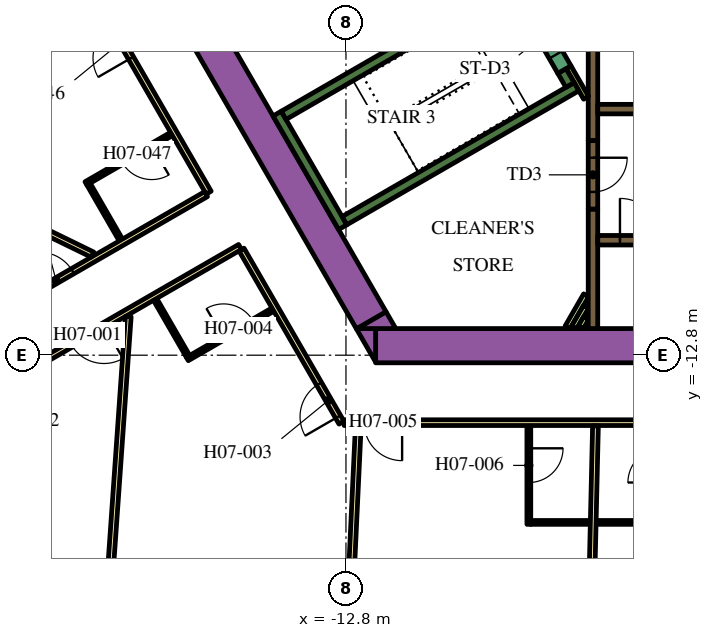
"""IFC4 building model, lengths in metres.
Left out: names, types, materials, properties, quantities, classifications, styles, units other than length and angle.
Written with IfcOpenShell. Run it as: python <this file> out.ifc"""

import sys

from ifc_helpers import new_model, si_unit, direction, frame, frame_2d, origin, place, context, subcontext, project, spatial, polyline, rectangle, outline, extrude, element, fill, save


model = new_model("IFC4")
c1 = context("Model", 3, precision=1e-05, world=origin(), true_north=direction((0.0, 1.0)))
c2 = subcontext(c1, "Body", "Model", "MODEL_VIEW")
j1 = project(units=[si_unit("LENGTHUNIT", "METRE"), si_unit("PLANEANGLEUNIT", "RADIAN")], contexts=[c1])
p1 = place(None, origin())
s1 = spatial("IfcSite", under=j1, at=p1, CompositionType="ELEMENT")
p2 = place(p1, origin())
s2 = spatial("IfcBuilding", under=s1, at=p2, CompositionType="ELEMENT")
p3 = place(p2, frame((0.0, 0.0, 103.2)))
s3 = spatial("IfcBuildingStorey", under=s2, at=p3, CompositionType="ELEMENT", Elevation=103.2)
p4 = place(p3, frame((-12.019, -12.55, 0.0), z_axis=(0.0, 0.0, 1.0), x_axis=(1.0, 0.0, 0.0)))
e1 = element("IfcWall", 1, at=p4, inside=s3, PredefinedType="SOLIDWALL", context=c2, shape_type="SweptSolid", body=[
    extrude(rectangle(XDim=21.63, YDim=0.9, at=frame_2d((10.815, 0.0))), origin(), (0.0, 0.0, 1.0), 3.9),
])
p5 = place(p3, origin())
e2 = element("IfcWall", 2, at=p5, inside=s3, PredefinedType="SOLIDWALL", context=c2, shape_type="SweptSolid", body=[
    extrude(outline(polyline([(-12.529, -12.1), (-12.021, -12.1), (-12.021, -12.98), (-12.529, -12.1)])), origin(), (0.0, 0.0, 1.0), 3.9),
])
p6 = place(p3, frame((-12.134, -11.883, 0.0), z_axis=(0.0, 0.0, 1.0), x_axis=(-0.500005339912, 0.866022320763, 0.0)))
e3 = element("IfcWall", 3, at=p6, inside=s3, PredefinedType="SOLIDWALL", context=c2, shape_type="SweptSolid", body=[
    extrude(rectangle(XDim=9.488, YDim=0.9, at=frame_2d((4.744, 0.0))), origin(), (0.0, 0.0, 1.0), 3.9),
])
e4 = element("IfcWall", 4, at=p5, inside=s3, PredefinedType="SOLIDWALL", context=c2, shape_type="SweptSolid", body=[
    extrude(outline(polyline([(-11.489, -12.1), (-12.505, -12.1), (-11.743, -11.66), (-11.489, -12.1)])), origin(), (0.0, 0.0, 1.0), 3.9),
])
p7 = place(p3, frame((-12.885, -9.431, 0.0), z_axis=(0.0, 0.0, 1.0), x_axis=(-0.500020560727, 0.866013532718, 0.0)))
e5 = element("IfcWall", 5, at=p7, inside=s3, PredefinedType="SOLIDWALL", context=c2, shape_type="SweptSolid", body=[
    extrude(rectangle(XDim=3.45, YDim=0.25, at=frame_2d((1.725, 0.0))), origin(), (0.0, 0.0, 1.0), 3.9),
])
p8 = place(p3, frame((-14.44, -6.49, 0.0), z_axis=(0.0, 0.0, 1.0), x_axis=(0.866022966069, 0.500004222222, 0.0)))
e6 = element("IfcWall", 6, at=p8, inside=s3, PredefinedType="SOLIDWALL", context=c2, shape_type="SweptSolid", body=[
    extrude(rectangle(XDim=6.8, YDim=0.25, at=frame_2d((3.4, 0.0))), origin(), (0.0, 0.0, 1.0), 3.9),
])
p9 = place(p3, frame((-12.84, -9.261, 0.0), z_axis=(0.0, 0.0, 1.0), x_axis=(0.866016039709, 0.500016218704, 0.0)))
e7 = element("IfcWall", 7, at=p9, inside=s3, PredefinedType="SOLIDWALL", context=c2, shape_type="SweptSolid", body=[
    extrude(rectangle(XDim=7.05, YDim=0.25, at=frame_2d((3.525, 0.0))), origin(), (0.0, 0.0, 1.0), 3.9),
])
p10 = place(p3, frame((-6.905, -5.69, 0.0), z_axis=(0.0, 0.0, 1.0), x_axis=(-0.500402024738, 0.865793170242, 0.0)))
e8 = element("IfcWall", 8, at=p10, inside=s3, PredefinedType="SOLIDWALL", context=c2, shape_type="SweptSolid", body=[
    extrude(rectangle(XDim=0.425, YDim=0.25, at=frame_2d((0.212, 0.0))), origin(), (0.0, 0.0, 1.0), 3.9),
])
p11 = place(p3, frame((-6.3, -12.1, 0.0), z_axis=(0.0, 0.0, 1.0), x_axis=(0.0, 1.0, 0.0)))
e9 = element("IfcWall", 9, at=p11, inside=s3, PredefinedType="SOLIDWALL", context=c2, shape_type="SweptSolid", body=[
    extrude(rectangle(XDim=3.146, YDim=0.25, at=frame_2d((1.573, 0.0))), origin(), (0.0, 0.0, 1.0), 3.9),
])
p12 = place(p3, frame((-6.3, -4.0, 0.0), z_axis=(0.0, 0.0, 1.0), x_axis=(0.0, -1.0, 0.0)))
e10 = element("IfcWall", 10, at=p12, inside=s3, PredefinedType="SOLIDWALL", context=c2, shape_type="SweptSolid", body=[
    extrude(rectangle(XDim=3.154, YDim=0.25, at=frame_2d((1.577, 0.0))), origin(), (0.0, 0.0, 1.0), 3.9),
])
p13 = place(p3, frame((-6.968, -12.068, 0.0), z_axis=(0.0, 0.0, 1.0), x_axis=(0.49998975084, 0.866031321059, 0.0)))
e11 = element("IfcWall", 11, at=p13, inside=s3, PredefinedType="PARTITIONING", context=c2, shape_type="SweptSolid", body=[
    extrude(rectangle(XDim=0.975, YDim=0.15, at=frame_2d((0.488, 0.0))), origin(), (0.0, 0.0, 1.0), 2.75),
])
p14 = place(p3, frame((-6.794, -12.068, 0.0), z_axis=(0.0, 0.0, 1.0), x_axis=(0.49985693963, 0.866107983974, 0.0)))
e12 = element("IfcWall", 12, at=p14, inside=s3, PredefinedType="PARTITIONING", context=c2, shape_type="SweptSolid", body=[
    extrude(rectangle(XDim=0.629, YDim=0.15, at=frame_2d((0.314, 0.0))), origin(), (0.0, 0.0, 1.0), 2.75),
])
p15 = place(p3, frame((-6.621, -12.068, 0.0), z_axis=(0.0, 0.0, 1.0), x_axis=(0.500046963369, 0.865998287773, 0.0)))
e13 = element("IfcWall", 13, at=p15, inside=s3, PredefinedType="PARTITIONING", context=c2, shape_type="SweptSolid", body=[
    extrude(rectangle(XDim=0.282, YDim=0.15, at=frame_2d((0.141, 0.0))), origin(), (0.0, 0.0, 1.0), 2.75),
])
p16 = place(p3, frame((-6.48, -6.027, 0.0), z_axis=(0.0, 0.0, 1.0), x_axis=(-0.499927229454, 0.866067413802, 0.0)))
e14 = element("IfcWall", 14, at=p16, inside=s3, PredefinedType="PARTITIONING", context=c2, shape_type="SweptSolid", body=[
    extrude(rectangle(XDim=0.929, YDim=0.15, at=frame_2d((0.464, 0.0))), origin(), (0.0, 0.0, 1.0), 3.9),
])
p17 = place(p3, frame((-6.175, -9.775, 0.0), z_axis=(0.0, 0.0, 1.0), x_axis=(1.0, 0.0, 0.0)))
e15 = element("IfcWall", 15, at=p17, inside=s3, PredefinedType="SOLIDWALL", context=c2, shape_type="SweptSolid", body=[
    extrude(rectangle(XDim=12.35, YDim=0.25, at=frame_2d((6.175, 0.0))), origin(), (0.0, 0.0, 1.0), 3.9),
])
p18 = place(p17, frame((0.585, 0.0, 0.0)))
e16 = element("IfcOpeningElement", 16, at=p18, cuts=e15, PredefinedType="OPENING", context=c2, shape_type="SweptSolid", body=[
    extrude(rectangle(XDim=1.1, YDim=2.1, at=frame_2d((0.55, 1.05))), frame((0.0, 0.135, 0.0), z_axis=(0.0, -1.0, 0.0), x_axis=(1.0, 0.0, 0.0)), (0.0, 0.0, 1.0), 0.27),
])
p19 = place(p17, frame((3.105, 0.0, 0.0)))
e17 = element("IfcOpeningElement", 17, at=p19, cuts=e15, PredefinedType="OPENING", context=c2, shape_type="SweptSolid", body=[
    extrude(rectangle(XDim=1.1, YDim=2.1, at=frame_2d((0.55, 1.05))), frame((0.0, 0.135, 0.0), z_axis=(0.0, -1.0, 0.0), x_axis=(1.0, 0.0, 0.0)), (0.0, 0.0, 1.0), 0.27),
])
p20 = place(p17, frame((5.625, 0.0, 0.0)))
e18 = element("IfcOpeningElement", 18, at=p20, cuts=e15, PredefinedType="OPENING", context=c2, shape_type="SweptSolid", body=[
    extrude(rectangle(XDim=1.1, YDim=2.1, at=frame_2d((0.55, 1.05))), frame((0.0, 0.135, 0.0), z_axis=(0.0, -1.0, 0.0), x_axis=(1.0, 0.0, 0.0)), (0.0, 0.0, 1.0), 0.27),
])
p21 = place(p17, frame((8.145, 0.0, 0.0)))
e19 = element("IfcOpeningElement", 19, at=p21, cuts=e15, PredefinedType="OPENING", context=c2, shape_type="SweptSolid", body=[
    extrude(rectangle(XDim=1.1, YDim=2.1, at=frame_2d((0.55, 1.05))), frame((0.0, 0.135, 0.0), z_axis=(0.0, -1.0, 0.0), x_axis=(1.0, 0.0, 0.0)), (0.0, 0.0, 1.0), 0.27),
])
p22 = place(p17, frame((10.665, 0.0, 0.0)))
e20 = element("IfcOpeningElement", 20, at=p22, cuts=e15, PredefinedType="OPENING", context=c2, shape_type="SweptSolid", body=[
    extrude(rectangle(XDim=1.1, YDim=2.1, at=frame_2d((0.55, 1.05))), frame((0.0, 0.135, 0.0), z_axis=(0.0, -1.0, 0.0), x_axis=(1.0, 0.0, 0.0)), (0.0, 0.0, 1.0), 0.27),
])
p23 = place(p3, frame((-6.175, -6.325, 0.0), z_axis=(0.0, 0.0, 1.0), x_axis=(1.0, 0.0, 0.0)))
e21 = element("IfcWall", 21, at=p23, inside=s3, PredefinedType="SOLIDWALL", context=c2, shape_type="SweptSolid", body=[
    extrude(rectangle(XDim=12.35, YDim=0.25, at=frame_2d((6.175, 0.0))), origin(), (0.0, 0.0, 1.0), 3.9),
])
p24 = place(p23, frame((3.205, 0.0, 0.0)))
e22 = element("IfcOpeningElement", 22, at=p24, cuts=e21, PredefinedType="OPENING", context=c2, shape_type="SweptSolid", body=[
    extrude(rectangle(XDim=0.9, YDim=2.1, at=frame_2d((0.45, 1.05))), frame((0.0, 0.135, 0.0), z_axis=(0.0, -1.0, 0.0), x_axis=(1.0, 0.0, 0.0)), (0.0, 0.0, 1.0), 0.27),
])
p25 = place(p23, frame((8.145, 0.0, 0.0)))
e23 = element("IfcOpeningElement", 23, at=p25, cuts=e21, PredefinedType="OPENING", context=c2, shape_type="SweptSolid", body=[
    extrude(rectangle(XDim=1.1, YDim=2.1, at=frame_2d((0.55, 1.05))), frame((0.0, 0.135, 0.0), z_axis=(0.0, -1.0, 0.0), x_axis=(1.0, 0.0, 0.0)), (0.0, 0.0, 1.0), 0.27),
])
p26 = place(p23, frame((10.665, 0.0, 0.0)))
e24 = element("IfcOpeningElement", 24, at=p26, cuts=e21, PredefinedType="OPENING", context=c2, shape_type="SweptSolid", body=[
    extrude(rectangle(XDim=1.1, YDim=2.1, at=frame_2d((0.55, 1.05))), frame((0.0, 0.135, 0.0), z_axis=(0.0, -1.0, 0.0), x_axis=(1.0, 0.0, 0.0)), (0.0, 0.0, 1.0), 0.27),
])
p27 = place(p3, frame((-8.103, -3.466, 0.0), z_axis=(0.0, 0.0, 1.0), x_axis=(0.500078061341, -0.865980330357, 0.0)))
e25 = element("IfcWall", 25, at=p27, inside=s3, PredefinedType="SOLIDWALL", context=c2, shape_type="SweptSolid", body=[
    extrude(rectangle(XDim=2.1, YDim=0.4, at=frame_2d((1.05, 0.0))), origin(), (0.0, 0.0, 1.0), 3.9),
])
p28 = place(p27, frame((0.45, 0.0, 0.0)))
e26 = element("IfcOpeningElement", 26, at=p28, cuts=e25, PredefinedType="OPENING", context=c2, shape_type="SweptSolid", body=[
    extrude(rectangle(XDim=1.2, YDim=2.1, at=frame_2d((0.6, 1.05))), frame((0.0, 0.21, 0.0), z_axis=(0.0, -1.0, 0.0), x_axis=(1.0, 0.0, 0.0)), (0.0, 0.0, 1.0), 0.42),
])
p29 = place(p3, frame((-6.3, -7.154, 0.0), z_axis=(0.0, 0.0, 1.0), x_axis=(0.0, -1.0, 0.0)))
e27 = element("IfcWall", 27, at=p29, inside=s3, PredefinedType="SOLIDWALL", context=c2, shape_type="SweptSolid", body=[
    extrude(rectangle(XDim=1.8, YDim=0.25, at=frame_2d((0.9, 0.0))), origin(), (0.0, 0.0, 1.0), 3.9),
])
p30 = place(p29, frame((0.45, 0.0, 0.0)))
e28 = element("IfcOpeningElement", 28, at=p30, cuts=e27, PredefinedType="OPENING", context=c2, shape_type="SweptSolid", body=[
    extrude(rectangle(XDim=0.9, YDim=2.1, at=frame_2d((0.45, 1.05))), frame((0.0, 0.135, 0.0), z_axis=(0.0, -1.0, 0.0), x_axis=(1.0, 0.0, 0.0)), (0.0, 0.0, 1.0), 0.27),
])
p31 = place(p3, frame((-16.412, -8.523, 0.0), z_axis=(0.0, 0.0, 1.0), x_axis=(-0.500001929737, 0.866024289647, 0.0)))
e29 = element("IfcWall", 29, at=p31, inside=s3, PredefinedType="PARTITIONING", context=c2, shape_type="SweptSolid", body=[
    extrude(rectangle(XDim=5.268, YDim=0.15, at=frame_2d((2.634, 0.0))), origin(), (0.0, 0.0, 1.0), 2.75),
])
p32 = place(p31, frame((4.088, 0.0, 0.0)))
e30 = element("IfcOpeningElement", 30, at=p32, cuts=e29, PredefinedType="OPENING", context=c2, shape_type="SweptSolid", body=[
    extrude(rectangle(XDim=1.0, YDim=2.1, at=frame_2d((0.5, 1.05))), frame((0.0, 0.085, 0.0), z_axis=(0.0, -1.0, 0.0), x_axis=(1.0, 0.0, 0.0)), (0.0, 0.0, 1.0), 0.17),
])
p33 = place(p3, frame((-28.211, -15.335, 0.0), z_axis=(0.0, 0.0, 1.0), x_axis=(0.866025884867, 0.49999916674, 0.0)))
e31 = element("IfcWall", 31, at=p33, inside=s3, PredefinedType="PARTITIONING", context=c2, shape_type="SweptSolid", body=[
    extrude(rectangle(XDim=13.543, YDim=0.15, at=frame_2d((6.772, 0.0))), origin(), (0.0, 0.0, 1.0), 2.75),
])
p34 = place(p33, frame((8.488, 0.0, 0.0)))
e32 = element("IfcOpeningElement", 32, at=p34, cuts=e31, PredefinedType="OPENING", context=c2, shape_type="SweptSolid", body=[
    extrude(rectangle(XDim=1.0, YDim=2.1, at=frame_2d((0.5, 1.05))), frame((0.0, 0.085, 0.0), z_axis=(0.0, -1.0, 0.0), x_axis=(1.0, 0.0, 0.0)), (0.0, 0.0, 1.0), 0.17),
])
p35 = place(p3, frame((-15.587, -9.952, 0.0), z_axis=(0.0, 0.0, 1.0), x_axis=(-0.866017869832, -0.500013048961, 0.0)))
e33 = element("IfcWall", 33, at=p35, inside=s3, PredefinedType="PARTITIONING", context=c2, shape_type="SweptSolid", body=[
    extrude(rectangle(XDim=13.624, YDim=0.15, at=frame_2d((6.812, 0.0))), origin(), (0.0, 0.0, 1.0), 2.75),
])
p36 = place(p35, frame((4.134, 0.0, 0.0)))
e34 = element("IfcOpeningElement", 34, at=p36, cuts=e33, PredefinedType="OPENING", context=c2, shape_type="SweptSolid", body=[
    extrude(rectangle(XDim=1.0, YDim=2.1, at=frame_2d((0.5, 1.05))), frame((0.0, 0.085, 0.0), z_axis=(0.0, -1.0, 0.0), x_axis=(1.0, 0.0, 0.0)), (0.0, 0.0, 1.0), 0.17),
])
p37 = place(p3, frame((-12.918, -14.575, 0.0), z_axis=(0.0, 0.0, 1.0), x_axis=(-0.500009150678, 0.866020120573, 0.0)))
e35 = element("IfcWall", 35, at=p37, inside=s3, PredefinedType="PARTITIONING", context=c2, shape_type="SweptSolid", body=[
    extrude(rectangle(XDim=5.258, YDim=0.15, at=frame_2d((2.629, 0.0))), origin(), (0.0, 0.0, 1.0), 2.75),
])
p38 = place(p37, frame((0.18, 0.0, 0.0)))
e36 = element("IfcOpeningElement", 36, at=p38, cuts=e35, PredefinedType="OPENING", context=c2, shape_type="SweptSolid", body=[
    extrude(rectangle(XDim=1.0, YDim=2.1, at=frame_2d((0.5, 1.05))), frame((0.0, 0.085, 0.0), z_axis=(0.0, -1.0, 0.0), x_axis=(1.0, 0.0, 0.0)), (0.0, 0.0, 1.0), 0.17),
])
p39 = place(p3, frame((12.918, -14.575, 0.0), z_axis=(0.0, 0.0, 1.0), x_axis=(-1.0, 0.0, 0.0)))
e37 = element("IfcWall", 37, at=p39, inside=s3, PredefinedType="PARTITIONING", context=c2, shape_type="SweptSolid", body=[
    extrude(rectangle(XDim=25.766, YDim=0.15, at=frame_2d((12.883, 0.0))), origin(), (0.0, 0.0, 1.0), 2.75),
])
p40 = place(p39, frame((24.24, 0.0, 0.0)))
e38 = element("IfcOpeningElement", 38, at=p40, cuts=e37, PredefinedType="OPENING", context=c2, shape_type="SweptSolid", body=[
    extrude(rectangle(XDim=1.0, YDim=2.1, at=frame_2d((0.5, 1.05))), frame((0.0, 0.085, 0.0), z_axis=(0.0, -1.0, 0.0), x_axis=(1.0, 0.0, 0.0)), (0.0, 0.0, 1.0), 0.17),
])
p41 = place(p39, frame((13.144, 0.0, 0.0)))
e39 = element("IfcOpeningElement", 39, at=p41, cuts=e37, PredefinedType="OPENING", context=c2, shape_type="SweptSolid", body=[
    extrude(rectangle(XDim=1.0, YDim=2.1, at=frame_2d((0.5, 1.05))), frame((0.0, 0.085, 0.0), z_axis=(0.0, -1.0, 0.0), x_axis=(1.0, 0.0, 0.0)), (0.0, 0.0, 1.0), 0.17),
])
p42 = place(p39, frame((11.693, 0.0, 0.0)))
e40 = element("IfcOpeningElement", 40, at=p42, cuts=e37, PredefinedType="OPENING", context=c2, shape_type="SweptSolid", body=[
    extrude(rectangle(XDim=1.0, YDim=2.1, at=frame_2d((0.5, 1.05))), frame((0.0, 0.085, 0.0), z_axis=(0.0, -1.0, 0.0), x_axis=(1.0, 0.0, 0.0)), (0.0, 0.0, 1.0), 0.17),
])
p43 = place(p39, frame((0.596, 0.0, 0.0)))
e41 = element("IfcOpeningElement", 41, at=p43, cuts=e37, PredefinedType="OPENING", context=c2, shape_type="SweptSolid", body=[
    extrude(rectangle(XDim=1.0, YDim=2.1, at=frame_2d((0.5, 1.05))), frame((0.0, 0.085, 0.0), z_axis=(0.0, -1.0, 0.0), x_axis=(1.0, 0.0, 0.0)), (0.0, 0.0, 1.0), 0.17),
])
p44 = place(p3, frame((-27.479, -6.251, 0.0), z_axis=(0.0, 0.0, 1.0), x_axis=(0.898945877276, -0.438059710231, 0.0)))
e42 = element("IfcWall", 42, at=p44, inside=s3, PredefinedType="PARTITIONING", context=c2, shape_type="SweptSolid", body=[
    extrude(rectangle(XDim=8.909, YDim=0.15, at=frame_2d((4.455, 0.0))), origin(), (0.0, 0.0, 1.0), 2.75),
])
p45 = place(p3, frame((-19.153, -20.671, 0.0), z_axis=(0.0, 0.0, 1.0), x_axis=(0.070070736723, 0.997542025107, 0.0)))
e43 = element("IfcWall", 43, at=p45, inside=s3, PredefinedType="PARTITIONING", context=c2, shape_type="SweptSolid", body=[
    extrude(rectangle(XDim=8.909, YDim=0.15, at=frame_2d((4.455, 0.0))), origin(), (0.0, 0.0, 1.0), 2.75),
])
p46 = place(p3, frame((-12.774, -21.045, 0.0), z_axis=(0.0, 0.0, 1.0), x_axis=(0.046750341626, 0.998906605023, 0.0)))
e44 = element("IfcWall", 44, at=p46, inside=s3, PredefinedType="PARTITIONING", context=c2, shape_type="SweptSolid", body=[
    extrude(rectangle(XDim=6.392, YDim=0.15, at=frame_2d((3.196, 0.0))), origin(), (0.0, 0.0, 1.0), 2.75),
])
p47 = place(p3, frame((-6.389, -21.269, 0.0), z_axis=(0.0, 0.0, 1.0), x_axis=(0.023377429176, 0.999726710559, 0.0)))
e45 = element("IfcWall", 45, at=p47, inside=s3, PredefinedType="PARTITIONING", context=c2, shape_type="SweptSolid", body=[
    extrude(rectangle(XDim=6.611, YDim=0.15, at=frame_2d((3.305, 0.0))), origin(), (0.0, 0.0, 1.0), 2.75),
])
p48 = place(p3, frame((-16.974, -12.9, 0.0), z_axis=(0.0, 0.0, 1.0), x_axis=(0.865997922154, 0.500047596559, 0.0)))
e46 = element("IfcWall", 46, at=p48, inside=s3, PredefinedType="PARTITIONING", context=c2, shape_type="SweptSolid", body=[
    extrude(rectangle(XDim=2.6, YDim=0.1, at=frame_2d((1.3, 0.0))), origin(), (0.0, 0.0, 1.0), 2.75),
])
p49 = place(p48, frame((1.1, 0.0, 0.0)))
e47 = element("IfcOpeningElement", 47, at=p49, cuts=e46, PredefinedType="OPENING", context=c2, shape_type="SweptSolid", body=[
    extrude(rectangle(XDim=0.9, YDim=2.1, at=frame_2d((0.45, 1.05))), frame((0.0, 0.06, 0.0), z_axis=(0.0, -1.0, 0.0), x_axis=(1.0, 0.0, 0.0)), (0.0, 0.0, 1.0), 0.12),
])
p50 = place(p3, frame((-16.956, -12.832, 0.0), z_axis=(0.0, 0.0, 1.0), x_axis=(-0.499978980201, 0.866037539231, 0.0)))
e48 = element("IfcWall", 48, at=p50, inside=s3, PredefinedType="PARTITIONING", context=c2, shape_type="SweptSolid", body=[
    extrude(rectangle(XDim=1.73, YDim=0.1, at=frame_2d((0.865, 0.0))), origin(), (0.0, 0.0, 1.0), 2.75),
])
p51 = place(p3, frame((-7.988, -14.65, 0.0), z_axis=(0.0, 0.0, 1.0), x_axis=(0.0, -1.0, 0.0)))
e49 = element("IfcWall", 49, at=p51, inside=s3, PredefinedType="PARTITIONING", context=c2, shape_type="SweptSolid", body=[
    extrude(rectangle(XDim=2.6, YDim=0.1, at=frame_2d((1.3, 0.0))), origin(), (0.0, 0.0, 1.0), 2.75),
])
p52 = place(p51, frame((0.6, 0.0, 0.0)))
e50 = element("IfcOpeningElement", 50, at=p52, cuts=e49, PredefinedType="OPENING", context=c2, shape_type="SweptSolid", body=[
    extrude(rectangle(XDim=0.9, YDim=2.1, at=frame_2d((0.45, 1.05))), frame((0.0, 0.06, 0.0), z_axis=(0.0, -1.0, 0.0), x_axis=(1.0, 0.0, 0.0)), (0.0, 0.0, 1.0), 0.12),
])
p53 = place(p3, frame((-7.938, -17.2, 0.0), z_axis=(0.0, 0.0, 1.0), x_axis=(1.0, 0.0, 0.0)))
e51 = element("IfcWall", 51, at=p53, inside=s3, PredefinedType="PARTITIONING", context=c2, shape_type="SweptSolid", body=[
    extrude(rectangle(XDim=1.56, YDim=0.1, at=frame_2d((0.78, 0.0))), origin(), (0.0, 0.0, 1.0), 2.75),
])
p54 = place(p3, frame((-4.53, -17.2, 0.0), z_axis=(0.0, 0.0, 1.0), x_axis=(-1.0, 0.0, 0.0)))
e52 = element("IfcWall", 52, at=p54, inside=s3, PredefinedType="PARTITIONING", context=c2, shape_type="SweptSolid", body=[
    extrude(rectangle(XDim=1.68, YDim=0.1, at=frame_2d((0.84, 0.0))), origin(), (0.0, 0.0, 1.0), 2.75),
])
p55 = place(p3, frame((-17.39, -6.979, 0.0), z_axis=(0.0, 0.0, 1.0), x_axis=(-0.866021400173, -0.500006934395, 0.0)))
e53 = element("IfcWall", 53, at=p55, inside=s3, PredefinedType="PARTITIONING", context=c2, shape_type="SweptSolid", body=[
    extrude(rectangle(XDim=2.6, YDim=0.1, at=frame_2d((1.3, 0.0))), origin(), (0.0, 0.0, 1.0), 2.75),
])
p56 = place(p55, frame((0.6, 0.0, 0.0)))
e54 = element("IfcOpeningElement", 54, at=p56, cuts=e53, PredefinedType="OPENING", context=c2, shape_type="SweptSolid", body=[
    extrude(rectangle(XDim=0.9, YDim=2.1, at=frame_2d((0.45, 1.05))), frame((0.0, 0.06, 0.0), z_axis=(0.0, -1.0, 0.0), x_axis=(1.0, 0.0, 0.0)), (0.0, 0.0, 1.0), 0.12),
])
p57 = place(p3, frame((-19.574, -8.297, 0.0), z_axis=(0.0, 0.0, 1.0), x_axis=(0.500062241894, -0.865989465428, 0.0)))
e55 = element("IfcWall", 55, at=p57, inside=s3, PredefinedType="PARTITIONING", context=c2, shape_type="SweptSolid", body=[
    extrude(rectangle(XDim=1.7, YDim=0.1, at=frame_2d((0.85, 0.0))), origin(), (0.0, 0.0, 1.0), 2.75),
])
p58 = place(p18, origin())
e56 = element("IfcDoor", 56, at=p58, inside=s3, OperationType="DOUBLE_DOOR_SLIDING", PredefinedType="DOOR", context=c2, shape_type="SweptSolid", body=[
    extrude(rectangle(XDim=1.1, YDim=2.1, at=frame_2d((0.55, 1.05))), frame((0.0, 0.025, 0.0), z_axis=(0.0, -1.0, 0.0), x_axis=(1.0, 0.0, 0.0)), (0.0, 0.0, 1.0), 0.05),
])
fill(e16, e56)
p59 = place(p28, origin())
e57 = element("IfcDoor", 57, at=p59, inside=s3, OperationType="SINGLE_SWING_LEFT", PredefinedType="DOOR", context=c2, shape_type="SweptSolid", body=[
    extrude(rectangle(XDim=1.2, YDim=2.1, at=frame_2d((0.6, 1.05))), frame((0.0, 0.025, 0.0), z_axis=(0.0, -1.0, 0.0), x_axis=(1.0, 0.0, 0.0)), (0.0, 0.0, 1.0), 0.05),
])
fill(e26, e57)
p60 = place(p30, origin())
e58 = element("IfcDoor", 58, at=p60, inside=s3, OperationType="SINGLE_SWING_LEFT", PredefinedType="DOOR", context=c2, shape_type="SweptSolid", body=[
    extrude(rectangle(XDim=0.9, YDim=2.1, at=frame_2d((0.45, 1.05))), frame((0.0, 0.025, 0.0), z_axis=(0.0, -1.0, 0.0), x_axis=(1.0, 0.0, 0.0)), (0.0, 0.0, 1.0), 0.05),
])
fill(e28, e58)
p61 = place(p36, origin())
e59 = element("IfcDoor", 59, at=p61, inside=s3, OperationType="SINGLE_SWING_LEFT", PredefinedType="DOOR", context=c2, shape_type="SweptSolid", body=[
    extrude(rectangle(XDim=1.0, YDim=2.1, at=frame_2d((0.5, 1.05))), frame((0.0, 0.025, 0.0), z_axis=(0.0, -1.0, 0.0), x_axis=(1.0, 0.0, 0.0)), (0.0, 0.0, 1.0), 0.05),
])
fill(e34, e59)
p62 = place(p38, origin())
e60 = element("IfcDoor", 60, at=p62, inside=s3, OperationType="SINGLE_SWING_LEFT", PredefinedType="DOOR", context=c2, shape_type="SweptSolid", body=[
    extrude(rectangle(XDim=1.0, YDim=2.1, at=frame_2d((0.5, 1.05))), frame((0.0, 0.025, 0.0), z_axis=(0.0, -1.0, 0.0), x_axis=(1.0, 0.0, 0.0)), (0.0, 0.0, 1.0), 0.05),
])
fill(e36, e60)
p63 = place(p49, origin())
e61 = element("IfcDoor", 61, at=p63, inside=s3, OperationType="SINGLE_SWING_LEFT", PredefinedType="DOOR", context=c2, shape_type="SweptSolid", body=[
    extrude(rectangle(XDim=0.9, YDim=2.1, at=frame_2d((0.45, 1.05))), frame((0.0, 0.025, 0.0), z_axis=(0.0, -1.0, 0.0), x_axis=(1.0, 0.0, 0.0)), (0.0, 0.0, 1.0), 0.05),
])
fill(e47, e61)
p64 = place(p40, origin())
e62 = element("IfcDoor", 62, at=p64, inside=s3, OperationType="SINGLE_SWING_RIGHT", PredefinedType="DOOR", context=c2, shape_type="SweptSolid", body=[
    extrude(rectangle(XDim=1.0, YDim=2.1, at=frame_2d((0.5, 1.05))), frame((0.0, 0.025, 0.0), z_axis=(0.0, -1.0, 0.0), x_axis=(1.0, 0.0, 0.0)), (0.0, 0.0, 1.0), 0.05),
])
fill(e38, e62)
p65 = place(p52, origin())
e63 = element("IfcDoor", 63, at=p65, inside=s3, OperationType="SINGLE_SWING_RIGHT", PredefinedType="DOOR", context=c2, shape_type="SweptSolid", body=[
    extrude(rectangle(XDim=0.9, YDim=2.1, at=frame_2d((0.45, 1.05))), frame((0.0, 0.025, 0.0), z_axis=(0.0, -1.0, 0.0), x_axis=(1.0, 0.0, 0.0)), (0.0, 0.0, 1.0), 0.05),
])
fill(e50, e63)
p66 = place(p32, origin())
e64 = element("IfcDoor", 64, at=p66, inside=s3, OperationType="SINGLE_SWING_RIGHT", PredefinedType="DOOR", context=c2, shape_type="SweptSolid", body=[
    extrude(rectangle(XDim=1.0, YDim=2.1, at=frame_2d((0.5, 1.05))), frame((0.0, 0.025, 0.0), z_axis=(0.0, -1.0, 0.0), x_axis=(1.0, 0.0, 0.0)), (0.0, 0.0, 1.0), 0.05),
])
fill(e30, e64)
p67 = place(p56, origin())
e65 = element("IfcDoor", 65, at=p67, inside=s3, OperationType="SINGLE_SWING_LEFT", PredefinedType="DOOR", context=c2, shape_type="SweptSolid", body=[
    extrude(rectangle(XDim=0.9, YDim=2.1, at=frame_2d((0.45, 1.05))), frame((0.0, 0.025, 0.0), z_axis=(0.0, -1.0, 0.0), x_axis=(1.0, 0.0, 0.0)), (0.0, 0.0, 1.0), 0.05),
])
fill(e54, e65)
p68 = place(p34, origin())
e66 = element("IfcDoor", 66, at=p68, inside=s3, OperationType="SINGLE_SWING_RIGHT", PredefinedType="DOOR", context=c2, shape_type="SweptSolid", body=[
    extrude(rectangle(XDim=1.0, YDim=2.1, at=frame_2d((0.5, 1.05))), frame((0.0, 0.025, 0.0), z_axis=(0.0, -1.0, 0.0), x_axis=(1.0, 0.0, 0.0)), (0.0, 0.0, 1.0), 0.05),
])
fill(e32, e66)
save(model, sys.argv[1])
